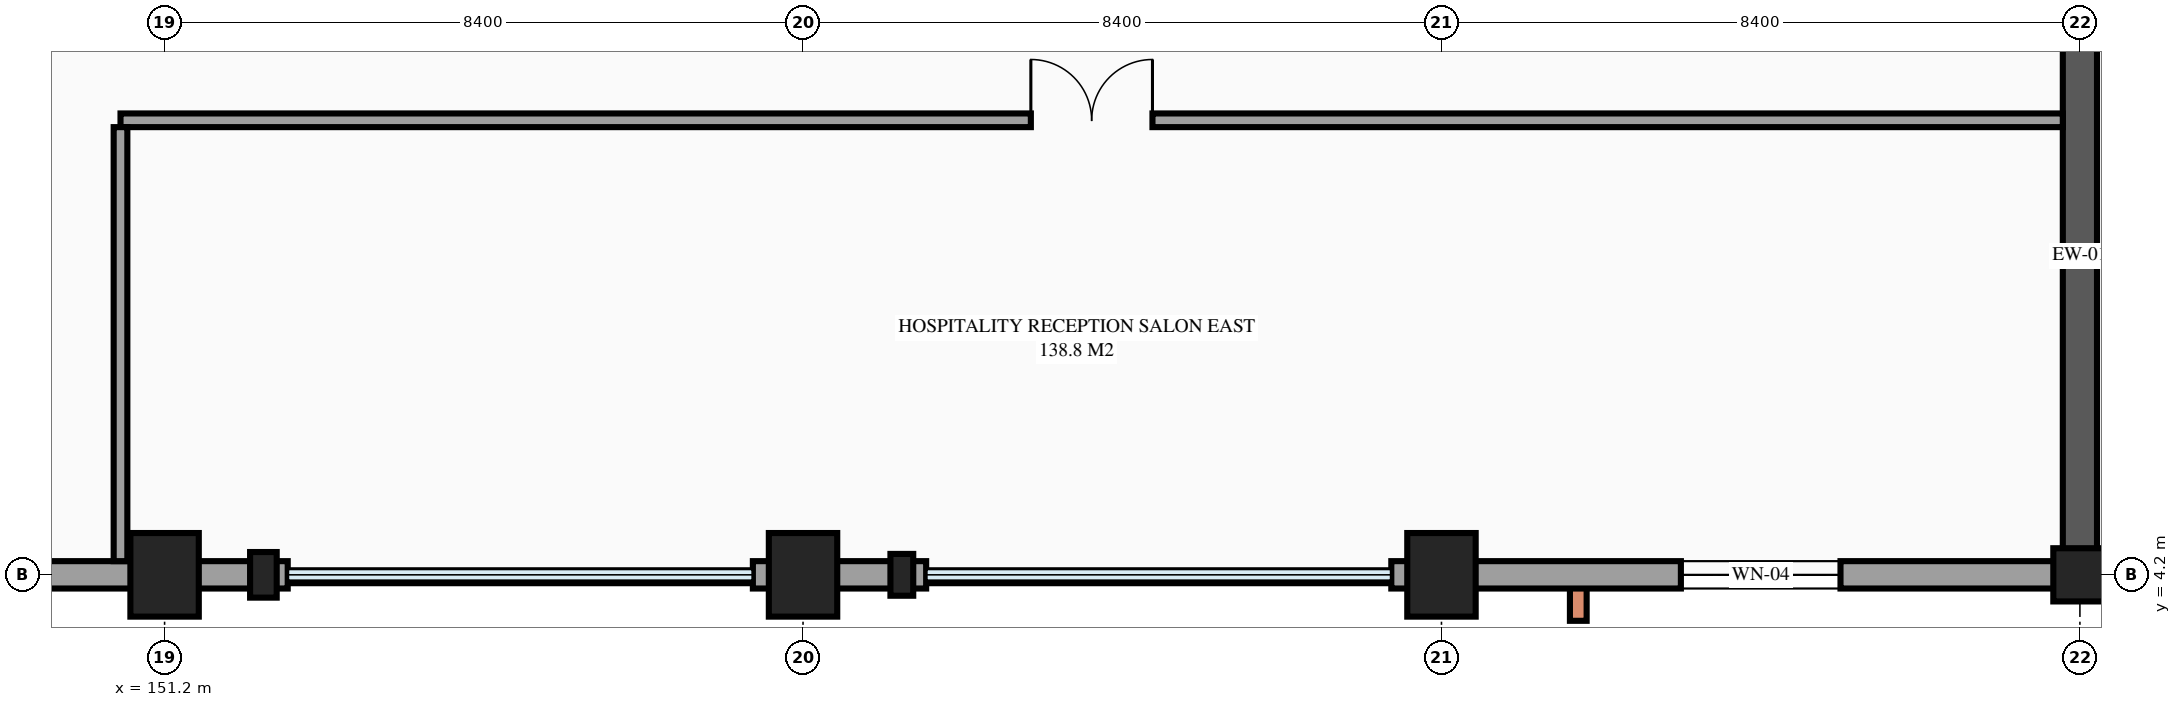
"""IFC4 building model, lengths in metres.
Left out: names, types, materials, properties, quantities, classifications, styles, units other than length and angle.
Written with IfcOpenShell. Run it as: python <this file> out.ifc"""

import sys

from ifc_helpers import new_model, si_unit, direction, frame, frame_2d, origin, origin_2d, place, context, subcontext, project, spatial, rectangle, extrude, element, fill, save


model = new_model("IFC4")
c1 = context("Model", 3, precision=1e-05, world=origin(), true_north=direction((0.0, 1.0)))
c2 = subcontext(c1, "Body", "Model", "MODEL_VIEW")
j1 = project(units=[si_unit("LENGTHUNIT", "METRE"), si_unit("PLANEANGLEUNIT", "RADIAN")], contexts=[c1])
p1 = place(None, origin())
s1 = spatial("IfcSite", under=j1, at=p1, CompositionType="ELEMENT")
p2 = place(p1, origin())
s2 = spatial("IfcBuilding", under=s1, at=p2, CompositionType="ELEMENT")
p3 = place(p2, frame((0.0, 0.0, 14.1)))
s3 = spatial("IfcBuildingStorey", under=s2, at=p3, CompositionType="ELEMENT", Elevation=14.1)
for number, where, z_axis, x_axis in (
    (1, (151.2, 4.2, 0.0), (0.0, 0.0, 1.0), (1.0, 0.0, 0.0)),
    (2, (159.6, 4.2, 0.0), (0.0, 0.0, 1.0), (1.0, 0.0, 0.0)),
    (3, (168.0, 4.2, 0.0), (0.0, 0.0, 1.0), (1.0, 0.0, 0.0)),
):
    element("IfcColumn", number, at=place(p3, frame(where, z_axis=z_axis, x_axis=x_axis)), inside=s3, PredefinedType="COLUMN", context=c2, shape_type="SweptSolid", body=[
        extrude(rectangle(XDim=0.9, YDim=1.1, at=origin_2d()), origin(), (0.0, 0.0, 1.0), 4.2),
    ])
p4 = place(p3, frame((176.4, 4.2, 0.0), z_axis=(0.0, 0.0, 1.0), x_axis=(1.0, 0.0, 0.0)))
e4 = element("IfcColumn", 4, at=p4, inside=s3, PredefinedType="COLUMN", context=c2, shape_type="SweptSolid", body=[
    extrude(rectangle(XDim=0.7, YDim=0.7, at=origin_2d()), origin(), (0.0, 0.0, 1.0), 4.2),
])
p5 = place(p3, frame((152.5, 4.2, 0.0), z_axis=(0.0, 0.0, 1.0), x_axis=(1.0, 0.0, 0.0)))
e5 = element("IfcColumn", 5, at=p5, inside=s3, PredefinedType="PILASTER", context=c2, shape_type="SweptSolid", body=[
    extrude(rectangle(XDim=0.35, YDim=0.6, at=origin_2d()), origin(), (0.0, 0.0, 1.0), 4.2),
])
p6 = place(p3, frame((160.9, 4.2, 0.0), z_axis=(0.0, 0.0, 1.0), x_axis=(1.0, 0.0, 0.0)))
e6 = element("IfcColumn", 6, at=p6, inside=s3, PredefinedType="PILASTER", context=c2, shape_type="SweptSolid", body=[
    extrude(rectangle(XDim=0.3, YDim=0.55, at=origin_2d()), origin(), (0.0, 0.0, 1.0), 4.2),
])
p7 = place(p3, frame((142.8, 4.2, 0.0), z_axis=(0.0, 0.0, 1.0), x_axis=(1.0, 0.0, 0.0)))
e7 = element("IfcWall", 7, at=p7, inside=s3, PredefinedType="STANDARD", context=c2, shape_type="SweptSolid", body=[
    extrude(rectangle(XDim=8.4, YDim=0.36, at=frame_2d((4.2, 0.0))), origin(), (0.0, 0.0, 1.0), 2.95),
])
p8 = place(p7, frame((3.3, 0.0, 0.75)))
e8 = element("IfcOpeningElement", 8, at=p8, cuts=e7, PredefinedType="OPENING", context=c2, shape_type="SweptSolid", body=[
    extrude(rectangle(XDim=1.8, YDim=1.5, at=frame_2d((0.9, 0.75))), frame((0.0, 0.19, 0.0), z_axis=(0.0, -1.0, 0.0), x_axis=(1.0, 0.0, 0.0)), (0.0, 0.0, 1.0), 0.38),
])
p9 = place(p3, frame((151.2, 4.2, 0.0), z_axis=(0.0, 0.0, 1.0), x_axis=(1.0, 0.0, 0.0)))
e9 = element("IfcWall", 9, at=p9, inside=s3, PredefinedType="STANDARD", context=c2, shape_type="SweptSolid", body=[
    extrude(rectangle(XDim=1.62, YDim=0.36, at=frame_2d((0.81, 0.0))), origin(), (0.0, 0.0, 1.0), 3.59),
])
p10 = place(p3, frame((158.94, 4.2, 0.0), z_axis=(0.0, 0.0, 1.0), x_axis=(1.0, 0.0, 0.0)))
e10 = element("IfcWall", 10, at=p10, inside=s3, PredefinedType="STANDARD", context=c2, shape_type="SweptSolid", body=[
    extrude(rectangle(XDim=0.66, YDim=0.36, at=frame_2d((0.33, 0.0))), origin(), (0.0, 0.0, 1.0), 4.2),
])
p11 = place(p3, frame((159.6, 4.2, 0.0), z_axis=(0.0, 0.0, 1.0), x_axis=(1.0, 0.0, 0.0)))
e11 = element("IfcWall", 11, at=p11, inside=s3, PredefinedType="STANDARD", context=c2, shape_type="SweptSolid", body=[
    extrude(rectangle(XDim=1.62, YDim=0.36, at=frame_2d((0.81, 0.0))), origin(), (0.0, 0.0, 1.0), 3.0),
])
p12 = place(p3, frame((167.34, 4.2, 0.0), z_axis=(0.0, 0.0, 1.0), x_axis=(1.0, 0.0, 0.0)))
e12 = element("IfcWall", 12, at=p12, inside=s3, PredefinedType="STANDARD", context=c2, shape_type="SweptSolid", body=[
    extrude(rectangle(XDim=0.66, YDim=0.36, at=frame_2d((0.33, 0.0))), origin(), (0.0, 0.0, 1.0), 4.2),
])
p13 = place(p3, frame((168.0, 4.2, 0.0), z_axis=(0.0, 0.0, 1.0), x_axis=(1.0, 0.0, 0.0)))
e13 = element("IfcWall", 13, at=p13, inside=s3, PredefinedType="STANDARD", context=c2, shape_type="SweptSolid", body=[
    extrude(rectangle(XDim=8.4, YDim=0.36, at=frame_2d((4.2, 0.0))), origin(), (0.0, 0.0, 1.0), 3.1),
])
p14 = place(p13, frame((3.15, 0.0, 0.75)))
e14 = element("IfcOpeningElement", 14, at=p14, cuts=e13, PredefinedType="OPENING", context=c2, shape_type="SweptSolid", body=[
    extrude(rectangle(XDim=2.1, YDim=1.5, at=frame_2d((1.05, 0.75))), frame((0.0, 0.19, 0.0), z_axis=(0.0, -1.0, 0.0), x_axis=(1.0, 0.0, 0.0)), (0.0, 0.0, 1.0), 0.38),
])
p15 = place(p3, frame((176.4, 4.2, 0.0), z_axis=(0.0, 0.0, 1.0), x_axis=(0.0, 1.0, 0.0)))
e15 = element("IfcWall", 15, at=p15, inside=s3, PredefinedType="STANDARD", context=c2, shape_type="SweptSolid", body=[
    extrude(rectangle(XDim=8.4, YDim=0.45, at=frame_2d((4.2, 0.0))), origin(), (0.0, 0.0, 1.0), 4.2),
])
p16 = place(p3, frame((150.62, 10.18, 0.0), z_axis=(0.0, 0.0, 1.0), x_axis=(1.0, 0.0, 0.0)))
e16 = element("IfcWall", 16, at=p16, inside=s3, PredefinedType="PARTITIONING", context=c2, shape_type="SweptSolid", body=[
    extrude(rectangle(XDim=25.555, YDim=0.18, at=frame_2d((12.777, 0.0))), origin(), (0.0, 0.0, 1.0), 3.895),
])
p17 = place(p16, frame((11.978, 0.0, 0.0)))
e17 = element("IfcOpeningElement", 17, at=p17, cuts=e16, PredefinedType="OPENING", context=c2, shape_type="SweptSolid", body=[
    extrude(rectangle(XDim=1.6, YDim=2.25, at=frame_2d((0.8, 1.125))), frame((0.0, 0.1, 0.0), z_axis=(0.0, -1.0, 0.0), x_axis=(1.0, 0.0, 0.0)), (0.0, 0.0, 1.0), 0.2),
])
p18 = place(p3, frame((150.62, 4.38, 0.0), z_axis=(0.0, 0.0, 1.0), x_axis=(0.0, 1.0, 0.0)))
e18 = element("IfcWall", 18, at=p18, inside=s3, PredefinedType="PARTITIONING", context=c2, shape_type="SweptSolid", body=[
    extrude(rectangle(XDim=5.71, YDim=0.18, at=frame_2d((2.855, 0.0))), origin(), (0.0, 0.0, 1.0), 3.895),
])
p19 = place(p14, origin())
e19 = element("IfcWindow", 19, at=p19, inside=s3, PartitioningType="SINGLE_PANEL", PredefinedType="WINDOW", context=c2, shape_type="SweptSolid", body=[
    extrude(rectangle(XDim=2.1, YDim=1.5, at=frame_2d((1.05, 0.75))), frame((0.0, 0.03, 0.0), z_axis=(0.0, -1.0, 0.0), x_axis=(1.0, 0.0, 0.0)), (0.0, 0.0, 1.0), 0.06),
])
fill(e14, e19)
p20 = place(p17, origin())
e20 = element("IfcDoor", 20, at=p20, inside=s3, OperationType="DOUBLE_DOOR_SINGLE_SWING", PredefinedType="DOOR", context=c2, shape_type="SweptSolid", body=[
    extrude(rectangle(XDim=1.6, YDim=2.25, at=frame_2d((0.8, 1.125))), frame((0.0, 0.025, 0.0), z_axis=(0.0, -1.0, 0.0), x_axis=(1.0, 0.0, 0.0)), (0.0, 0.0, 1.0), 0.05),
])
fill(e17, e20)
save(model, sys.argv[1])
